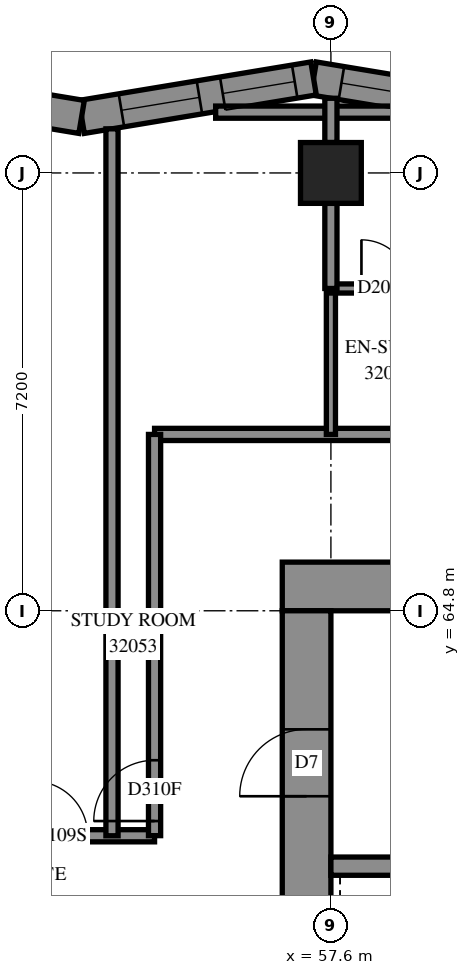
"""IFC4 building model, lengths in metres.
Left out: names, types, materials, properties, quantities, classifications, styles, units other than length and angle.
Written with IfcOpenShell. Run it as: python <this file> out.ifc"""

import sys

from ifc_helpers import new_model, si_unit, direction, frame, frame_2d, origin, origin_2d, place, context, subcontext, project, spatial, polyline, rectangle, outline, extrude, element, fill, save


model = new_model("IFC4")
c1 = context("Model", 3, precision=1e-05, world=origin(), true_north=direction((0.0, 1.0)))
c2 = subcontext(c1, "Body", "Model", "MODEL_VIEW")
j1 = project(units=[si_unit("LENGTHUNIT", "METRE"), si_unit("PLANEANGLEUNIT", "RADIAN")], contexts=[c1])
p1 = place(None, origin())
s1 = spatial("IfcSite", under=j1, at=p1, CompositionType="ELEMENT")
p2 = place(p1, origin())
s2 = spatial("IfcBuilding", under=s1, at=p2, CompositionType="ELEMENT")
p3 = place(p2, frame((0.0, 0.0, 118.6)))
s3 = spatial("IfcBuildingStorey", under=s2, at=p3, CompositionType="ELEMENT", Elevation=118.6)
p4 = place(p3, frame((57.6, 72.0, 0.0), z_axis=(0.0, 0.0, 1.0), x_axis=(1.0, 0.0, 0.0)))
e1 = element("IfcColumn", 1, at=p4, inside=s3, PredefinedType="COLUMN", context=c2, shape_type="SweptSolid", body=[
    extrude(rectangle(XDim=1.0, YDim=1.0, at=origin_2d()), origin(), (0.0, 0.0, 1.0), 3.1),
])
p5 = place(p3, frame((56.8, 65.2, -0.3), z_axis=(0.0, 0.0, 1.0), x_axis=(1.0, 0.0, 0.0)))
e2 = element("IfcWall", 2, at=p5, inside=s3, PredefinedType="SHEAR", context=c2, shape_type="SweptSolid", body=[
    extrude(rectangle(XDim=16.0, YDim=0.8, at=frame_2d((8.0, 0.0))), origin(), (0.0, 0.0, 1.0), 2.7),
])
p6 = place(p5, frame((10.8, 0.0, 0.3)))
e3 = element("IfcOpeningElement", 3, at=p6, cuts=e2, PredefinedType="OPENING", context=c2, shape_type="SweptSolid", body=[
    extrude(rectangle(XDim=0.8, YDim=2.1, at=frame_2d((0.4, 1.05))), frame((0.0, 0.41, 0.0), z_axis=(0.0, -1.0, 0.0), x_axis=(1.0, 0.0, 0.0)), (0.0, 0.0, 1.0), 0.82),
])
p7 = place(p3, frame((57.2, 50.4, -0.3), z_axis=(0.0, 0.0, 1.0), x_axis=(0.0, 1.0, 0.0)))
e4 = element("IfcWall", 4, at=p7, inside=s3, PredefinedType="SHEAR", context=c2, shape_type="SweptSolid", body=[
    extrude(rectangle(XDim=14.4, YDim=0.8, at=frame_2d((7.2, 0.0))), origin(), (0.0, 0.0, 1.0), 2.7),
])
p8 = place(p7, frame((4.55, 0.0, 0.3)))
e5 = element("IfcOpeningElement", 5, at=p8, cuts=e4, PredefinedType="OPENING", context=c2, shape_type="SweptSolid", body=[
    extrude(rectangle(XDim=1.1, YDim=2.1, at=frame_2d((0.55, 1.05))), frame((0.0, 0.41, 0.0), z_axis=(0.0, -1.0, 0.0), x_axis=(1.0, 0.0, 0.0)), (0.0, 0.0, 1.0), 0.82),
])
p9 = place(p7, frame((11.35, 0.0, 0.3)))
e6 = element("IfcOpeningElement", 6, at=p9, cuts=e4, PredefinedType="OPENING", context=c2, shape_type="SweptSolid", body=[
    extrude(rectangle(XDim=1.1, YDim=2.1, at=frame_2d((0.55, 1.05))), frame((0.0, 0.41, 0.0), z_axis=(0.0, -1.0, 0.0), x_axis=(1.0, 0.0, 0.0)), (0.0, 0.0, 1.0), 0.82),
])
p10 = place(p3, frame((57.6, 60.6, 0.0), z_axis=(0.0, 0.0, 1.0), x_axis=(1.0, 0.0, 0.0)))
e7 = element("IfcWall", 7, at=p10, inside=s3, PredefinedType="SOLIDWALL", context=c2, shape_type="SweptSolid", body=[
    extrude(rectangle(XDim=7.2, YDim=0.3, at=frame_2d((3.6, 0.0))), origin(), (0.0, 0.0, 1.0), 3.1),
])
p11 = place(p3, frame((61.13, 72.921, 0.0), z_axis=(0.0, 0.0, 1.0), x_axis=(-0.9865110911, 0.1636944324, 0.0)))
e8 = element("IfcWall", 8, at=p11, inside=s3, PredefinedType="SOLIDWALL", context=c2, shape_type="SweptSolid", body=[
    extrude(outline(polyline([(0.046, -0.275), (3.913, -0.275), (3.821, 0.275), (-0.046, 0.275), (0.046, -0.275)])), origin(), (0.0, 0.0, 1.0), 3.1),
])
p12 = place(p11, frame((0.511, 0.0, 0.5)))
e9 = element("IfcOpeningElement", 9, at=p12, cuts=e8, PredefinedType="OPENING", context=c2, shape_type="SweptSolid", body=[
    extrude(rectangle(XDim=1.3, YDim=2.45, at=frame_2d((0.65, 1.225))), frame((0.0, 0.285, 0.0), z_axis=(0.0, -1.0, 0.0), x_axis=(1.0, 0.0, 0.0)), (0.0, 0.0, 1.0), 0.57),
])
p13 = place(p11, frame((2.402, 0.0, 0.45)))
e10 = element("IfcOpeningElement", 10, at=p13, cuts=e8, PredefinedType="OPENING", context=c2, shape_type="SweptSolid", body=[
    extrude(rectangle(XDim=1.0, YDim=2.5, at=frame_2d((0.5, 1.25))), frame((0.0, 0.285, 0.0), z_axis=(0.0, -1.0, 0.0), x_axis=(1.0, 0.0, 0.0)), (0.0, 0.0, 1.0), 0.57),
])
p14 = place(p3, frame((57.315, 73.554, 0.0), z_axis=(0.0, 0.0, 1.0), x_axis=(-0.9865110911, -0.1636944324, 0.0)))
e11 = element("IfcWall", 11, at=p14, inside=s3, PredefinedType="SOLIDWALL", context=c2, shape_type="SweptSolid", body=[
    extrude(outline(polyline([(-0.046, -0.275), (3.821, -0.275), (3.913, 0.275), (0.046, 0.275), (-0.046, -0.275)])), origin(), (0.0, 0.0, 1.0), 3.1),
])
p15 = place(p14, frame((1.903, 0.0, 0.5)))
e12 = element("IfcOpeningElement", 12, at=p15, cuts=e11, PredefinedType="OPENING", context=c2, shape_type="SweptSolid", body=[
    extrude(rectangle(XDim=1.3, YDim=2.45, at=frame_2d((0.65, 1.225))), frame((0.0, 0.285, 0.0), z_axis=(0.0, -1.0, 0.0), x_axis=(1.0, 0.0, 0.0)), (0.0, 0.0, 1.0), 0.57),
])
p16 = place(p14, frame((0.315, 0.0, 0.5)))
e13 = element("IfcOpeningElement", 13, at=p16, cuts=e11, PredefinedType="OPENING", context=c2, shape_type="SweptSolid", body=[
    extrude(rectangle(XDim=1.2, YDim=2.45, at=frame_2d((0.6, 1.225))), frame((0.0, 0.285, 0.0), z_axis=(0.0, -1.0, 0.0), x_axis=(1.0, 0.0, 0.0)), (0.0, 0.0, 1.0), 0.57),
])
p17 = place(p3, frame((53.5, 72.921, 0.0), z_axis=(0.0, 0.0, 1.0), x_axis=(-0.9865110911, 0.1636944324, 0.0)))
e14 = element("IfcWall", 14, at=p17, inside=s3, PredefinedType="SOLIDWALL", context=c2, shape_type="SweptSolid", body=[
    extrude(outline(polyline([(0.046, -0.275), (3.913, -0.275), (3.821, 0.275), (-0.046, 0.275), (0.046, -0.275)])), origin(), (0.0, 0.0, 1.0), 3.1),
])
p18 = place(p17, frame((0.871, 0.0, 0.5)))
e15 = element("IfcOpeningElement", 15, at=p18, cuts=e14, PredefinedType="OPENING", context=c2, shape_type="SweptSolid", body=[
    extrude(rectangle(XDim=1.2, YDim=2.45, at=frame_2d((0.6, 1.225))), frame((0.0, 0.285, 0.0), z_axis=(0.0, -1.0, 0.0), x_axis=(1.0, 0.0, 0.0)), (0.0, 0.0, 1.0), 0.57),
])
p19 = place(p3, frame((33.502, 61.1, 0.0), z_axis=(0.0, 0.0, 1.0), x_axis=(1.0, 0.0, 0.0)))
e16 = element("IfcWall", 16, at=p19, inside=s3, PredefinedType="PARTITIONING", context=c2, shape_type="SweptSolid", body=[
    extrude(rectangle(XDim=21.198, YDim=0.2, at=frame_2d((10.599, 0.0))), origin(), (0.0, 0.0, 1.0), 3.1),
])
p20 = place(p19, frame((4.798, 0.0, 0.0)))
e17 = element("IfcOpeningElement", 17, at=p20, cuts=e16, PredefinedType="OPENING", context=c2, shape_type="SweptSolid", body=[
    extrude(rectangle(XDim=0.9, YDim=2.1, at=frame_2d((0.45, 1.05))), frame((0.0, 0.11, 0.0), z_axis=(0.0, -1.0, 0.0), x_axis=(1.0, 0.0, 0.0)), (0.0, 0.0, 1.0), 0.22),
])
p21 = place(p19, frame((6.498, 0.0, 0.0)))
e18 = element("IfcOpeningElement", 18, at=p21, cuts=e16, PredefinedType="OPENING", context=c2, shape_type="SweptSolid", body=[
    extrude(rectangle(XDim=0.9, YDim=2.1, at=frame_2d((0.45, 1.05))), frame((0.0, 0.11, 0.0), z_axis=(0.0, -1.0, 0.0), x_axis=(1.0, 0.0, 0.0)), (0.0, 0.0, 1.0), 0.22),
])
p22 = place(p19, frame((11.998, 0.0, 0.0)))
e19 = element("IfcOpeningElement", 19, at=p22, cuts=e16, PredefinedType="OPENING", context=c2, shape_type="SweptSolid", body=[
    extrude(rectangle(XDim=0.9, YDim=2.1, at=frame_2d((0.45, 1.05))), frame((0.0, 0.11, 0.0), z_axis=(0.0, -1.0, 0.0), x_axis=(1.0, 0.0, 0.0)), (0.0, 0.0, 1.0), 0.22),
])
p23 = place(p19, frame((13.698, 0.0, 0.0)))
e20 = element("IfcOpeningElement", 20, at=p23, cuts=e16, PredefinedType="OPENING", context=c2, shape_type="SweptSolid", body=[
    extrude(rectangle(XDim=0.9, YDim=2.1, at=frame_2d((0.45, 1.05))), frame((0.0, 0.11, 0.0), z_axis=(0.0, -1.0, 0.0), x_axis=(1.0, 0.0, 0.0)), (0.0, 0.0, 1.0), 0.22),
])
p24 = place(p19, frame((19.198, 0.0, 0.0)))
e21 = element("IfcOpeningElement", 21, at=p24, cuts=e16, PredefinedType="OPENING", context=c2, shape_type="SweptSolid", body=[
    extrude(rectangle(XDim=0.9, YDim=2.1, at=frame_2d((0.45, 1.05))), frame((0.0, 0.11, 0.0), z_axis=(0.0, -1.0, 0.0), x_axis=(1.0, 0.0, 0.0)), (0.0, 0.0, 1.0), 0.22),
])
p25 = place(p3, frame((54.7, 67.7, 0.0), z_axis=(0.0, 0.0, 1.0), x_axis=(1.0, 0.0, 0.0)))
e22 = element("IfcWall", 22, at=p25, inside=s3, PredefinedType="PARTITIONING", context=c2, shape_type="SweptSolid", body=[
    extrude(rectangle(XDim=20.2, YDim=0.2, at=frame_2d((10.1, 0.0))), origin(), (0.0, 0.0, 1.0), 3.1),
])
p26 = place(p25, frame((5.2, 0.0, 0.0)))
e23 = element("IfcOpeningElement", 23, at=p26, cuts=e22, PredefinedType="OPENING", context=c2, shape_type="SweptSolid", body=[
    extrude(rectangle(XDim=0.9, YDim=2.1, at=frame_2d((0.45, 1.05))), frame((0.0, 0.11, 0.0), z_axis=(0.0, -1.0, 0.0), x_axis=(1.0, 0.0, 0.0)), (0.0, 0.0, 1.0), 0.22),
])
p27 = place(p25, frame((8.838, 0.0, 0.0)))
e24 = element("IfcOpeningElement", 24, at=p27, cuts=e22, PredefinedType="OPENING", context=c2, shape_type="SweptSolid", body=[
    extrude(rectangle(XDim=1.0, YDim=2.1, at=frame_2d((0.5, 1.05))), frame((0.0, 0.11, 0.0), z_axis=(0.0, -1.0, 0.0), x_axis=(1.0, 0.0, 0.0)), (0.0, 0.0, 1.0), 0.22),
])
p28 = place(p25, frame((14.1, 0.0, 0.0)))
e25 = element("IfcOpeningElement", 25, at=p28, cuts=e22, PredefinedType="OPENING", context=c2, shape_type="SweptSolid", body=[
    extrude(rectangle(XDim=0.9, YDim=2.1, at=frame_2d((0.45, 1.05))), frame((0.0, 0.11, 0.0), z_axis=(0.0, -1.0, 0.0), x_axis=(1.0, 0.0, 0.0)), (0.0, 0.0, 1.0), 0.22),
])
p29 = place(p3, frame((54.0, 61.1, 0.0), z_axis=(0.0, 0.0, 1.0), x_axis=(0.0, 1.0, 0.0)))
e26 = element("IfcWall", 26, at=p29, inside=s3, PredefinedType="PARTITIONING", context=c2, shape_type="SweptSolid", body=[
    extrude(rectangle(XDim=11.625, YDim=0.2, at=frame_2d((5.813, 0.0))), origin(), (0.0, 0.0, 1.0), 3.1),
])
p30 = place(p3, frame((54.7, 61.102, 0.0), z_axis=(0.0, 0.0, 1.0), x_axis=(0.0, 1.0, 0.0)))
e27 = element("IfcWall", 27, at=p30, inside=s3, PredefinedType="PARTITIONING", context=c2, shape_type="SweptSolid", body=[
    extrude(rectangle(XDim=6.598, YDim=0.2, at=frame_2d((3.299, 0.0))), origin(), (0.0, 0.0, 1.0), 3.1),
])
p31 = place(p30, frame((0.24, 0.0, 0.0)))
e28 = element("IfcOpeningElement", 28, at=p31, cuts=e27, PredefinedType="OPENING", context=c2, shape_type="SweptSolid", body=[
    extrude(rectangle(XDim=1.0, YDim=2.1, at=frame_2d((0.5, 1.05))), frame((0.0, 0.11, 0.0), z_axis=(0.0, -1.0, 0.0), x_axis=(1.0, 0.0, 0.0)), (0.0, 0.0, 1.0), 0.22),
])
p32 = place(p3, frame((55.705, 73.0, 0.0), z_axis=(0.0, 0.0, 1.0), x_axis=(1.0, 0.0, 0.0)))
e29 = element("IfcWall", 29, at=p32, inside=s3, PredefinedType="PARTITIONING", context=c2, shape_type="SweptSolid", body=[
    extrude(rectangle(XDim=3.22, YDim=0.2, at=frame_2d((1.61, 0.0))), origin(), (0.0, 0.0, 1.0), 3.1),
])
p33 = place(p3, frame((57.6, 67.7, 0.0), z_axis=(0.0, 0.0, 1.0), x_axis=(0.0, 1.0, 0.0)))
e30 = element("IfcWall", 30, at=p33, inside=s3, PredefinedType="PARTITIONING", context=c2, shape_type="SweptSolid", body=[
    extrude(rectangle(XDim=2.4, YDim=0.15, at=frame_2d((1.2, 0.0))), origin(), (0.0, 0.0, 1.0), 3.1),
])
p34 = place(p3, frame((57.6, 70.1, 0.0), z_axis=(0.0, 0.0, 1.0), x_axis=(1.0, 0.0, 0.0)))
e31 = element("IfcWall", 31, at=p34, inside=s3, PredefinedType="PARTITIONING", context=c2, shape_type="SweptSolid", body=[
    extrude(rectangle(XDim=1.9, YDim=0.15, at=frame_2d((0.95, 0.0))), origin(), (0.0, 0.0, 1.0), 3.1),
])
p35 = place(p34, frame((0.502, 0.0, 0.0)))
e32 = element("IfcOpeningElement", 32, at=p35, cuts=e31, PredefinedType="OPENING", context=c2, shape_type="SweptSolid", body=[
    extrude(rectangle(XDim=0.8, YDim=2.1, at=frame_2d((0.4, 1.05))), frame((0.0, 0.085, 0.0), z_axis=(0.0, -1.0, 0.0), x_axis=(1.0, 0.0, 0.0)), (0.0, 0.0, 1.0), 0.17),
])
p36 = place(p3, frame((57.6, 70.1, 0.0), z_axis=(0.0, 0.0, 1.0), x_axis=(0.0, 1.0, 0.0)))
e33 = element("IfcWall", 33, at=p36, inside=s3, PredefinedType="PARTITIONING", context=c2, shape_type="SweptSolid", body=[
    extrude(rectangle(XDim=1.4, YDim=0.2, at=frame_2d((0.7, 0.0))), origin(), (0.0, 0.0, 1.0), 3.1),
])
p37 = place(p3, frame((57.6, 72.5, 0.0), z_axis=(0.0, 0.0, 1.0), x_axis=(0.0, 1.0, 0.0)))
e34 = element("IfcWall", 34, at=p37, inside=s3, PredefinedType="PARTITIONING", context=c2, shape_type="SweptSolid", body=[
    extrude(rectangle(XDim=0.728, YDim=0.2, at=frame_2d((0.364, 0.0))), origin(), (0.0, 0.0, 1.0), 3.1),
])
p38 = place(p15, origin())
e35 = element("IfcWindow", 35, at=p38, inside=s3, PartitioningType="SINGLE_PANEL", PredefinedType="WINDOW", context=c2, shape_type="SweptSolid", body=[
    extrude(rectangle(XDim=1.3, YDim=2.45, at=frame_2d((0.65, 1.225))), frame((0.0, 0.155, 0.0), z_axis=(0.0, -1.0, 0.0), x_axis=(1.0, 0.0, 0.0)), (0.0, 0.0, 1.0), 0.06),
])
fill(e12, e35)
p39 = place(p9, origin())
e36 = element("IfcDoor", 36, at=p39, inside=s3, OperationType="SINGLE_SWING_LEFT", PredefinedType="DOOR", context=c2, shape_type="SweptSolid", body=[
    extrude(rectangle(XDim=1.1, YDim=2.1, at=frame_2d((0.55, 1.05))), frame((0.0, 0.025, 0.0), z_axis=(0.0, -1.0, 0.0), x_axis=(1.0, 0.0, 0.0)), (0.0, 0.0, 1.0), 0.05),
])
fill(e6, e36)
p40 = place(p24, origin())
e37 = element("IfcDoor", 37, at=p40, inside=s3, OperationType="SINGLE_SWING_RIGHT", PredefinedType="DOOR", context=c2, shape_type="SweptSolid", body=[
    extrude(rectangle(XDim=0.9, YDim=2.1, at=frame_2d((0.45, 1.05))), frame((0.0, 0.025, 0.0), z_axis=(0.0, -1.0, 0.0), x_axis=(1.0, 0.0, 0.0)), (0.0, 0.0, 1.0), 0.05),
])
fill(e21, e37)
p41 = place(p31, origin())
e38 = element("IfcDoor", 38, at=p41, inside=s3, OperationType="SINGLE_SWING_LEFT", PredefinedType="DOOR", context=c2, shape_type="SweptSolid", body=[
    extrude(rectangle(XDim=1.0, YDim=2.1, at=frame_2d((0.5, 1.05))), frame((0.0, 0.025, 0.0), z_axis=(0.0, -1.0, 0.0), x_axis=(1.0, 0.0, 0.0)), (0.0, 0.0, 1.0), 0.05),
])
fill(e28, e38)
p42 = place(p35, origin())
e39 = element("IfcDoor", 39, at=p42, inside=s3, OperationType="SINGLE_SWING_RIGHT", PredefinedType="DOOR", context=c2, shape_type="SweptSolid", body=[
    extrude(rectangle(XDim=0.8, YDim=2.1, at=frame_2d((0.4, 1.05))), frame((0.0, 0.025, 0.0), z_axis=(0.0, -1.0, 0.0), x_axis=(1.0, 0.0, 0.0)), (0.0, 0.0, 1.0), 0.05),
])
fill(e32, e39)
p43 = place(p13, origin())
e40 = element("IfcWindow", 40, at=p43, inside=s3, PartitioningType="SINGLE_PANEL", PredefinedType="WINDOW", context=c2, shape_type="SweptSolid", body=[
    extrude(rectangle(XDim=1.0, YDim=2.5, at=frame_2d((0.5, 1.25))), frame((0.0, 0.155, 0.0), z_axis=(0.0, -1.0, 0.0), x_axis=(1.0, 0.0, 0.0)), (0.0, 0.0, 1.0), 0.06),
])
fill(e10, e40)
p44 = place(p16, origin())
e41 = element("IfcWindow", 41, at=p44, inside=s3, PartitioningType="SINGLE_PANEL", PredefinedType="WINDOW", context=c2, shape_type="SweptSolid", body=[
    extrude(rectangle(XDim=1.2, YDim=2.45, at=frame_2d((0.6, 1.225))), frame((0.0, 0.155, 0.0), z_axis=(0.0, -1.0, 0.0), x_axis=(1.0, 0.0, 0.0)), (0.0, 0.0, 1.0), 0.06),
])
fill(e13, e41)
save(model, sys.argv[1])
